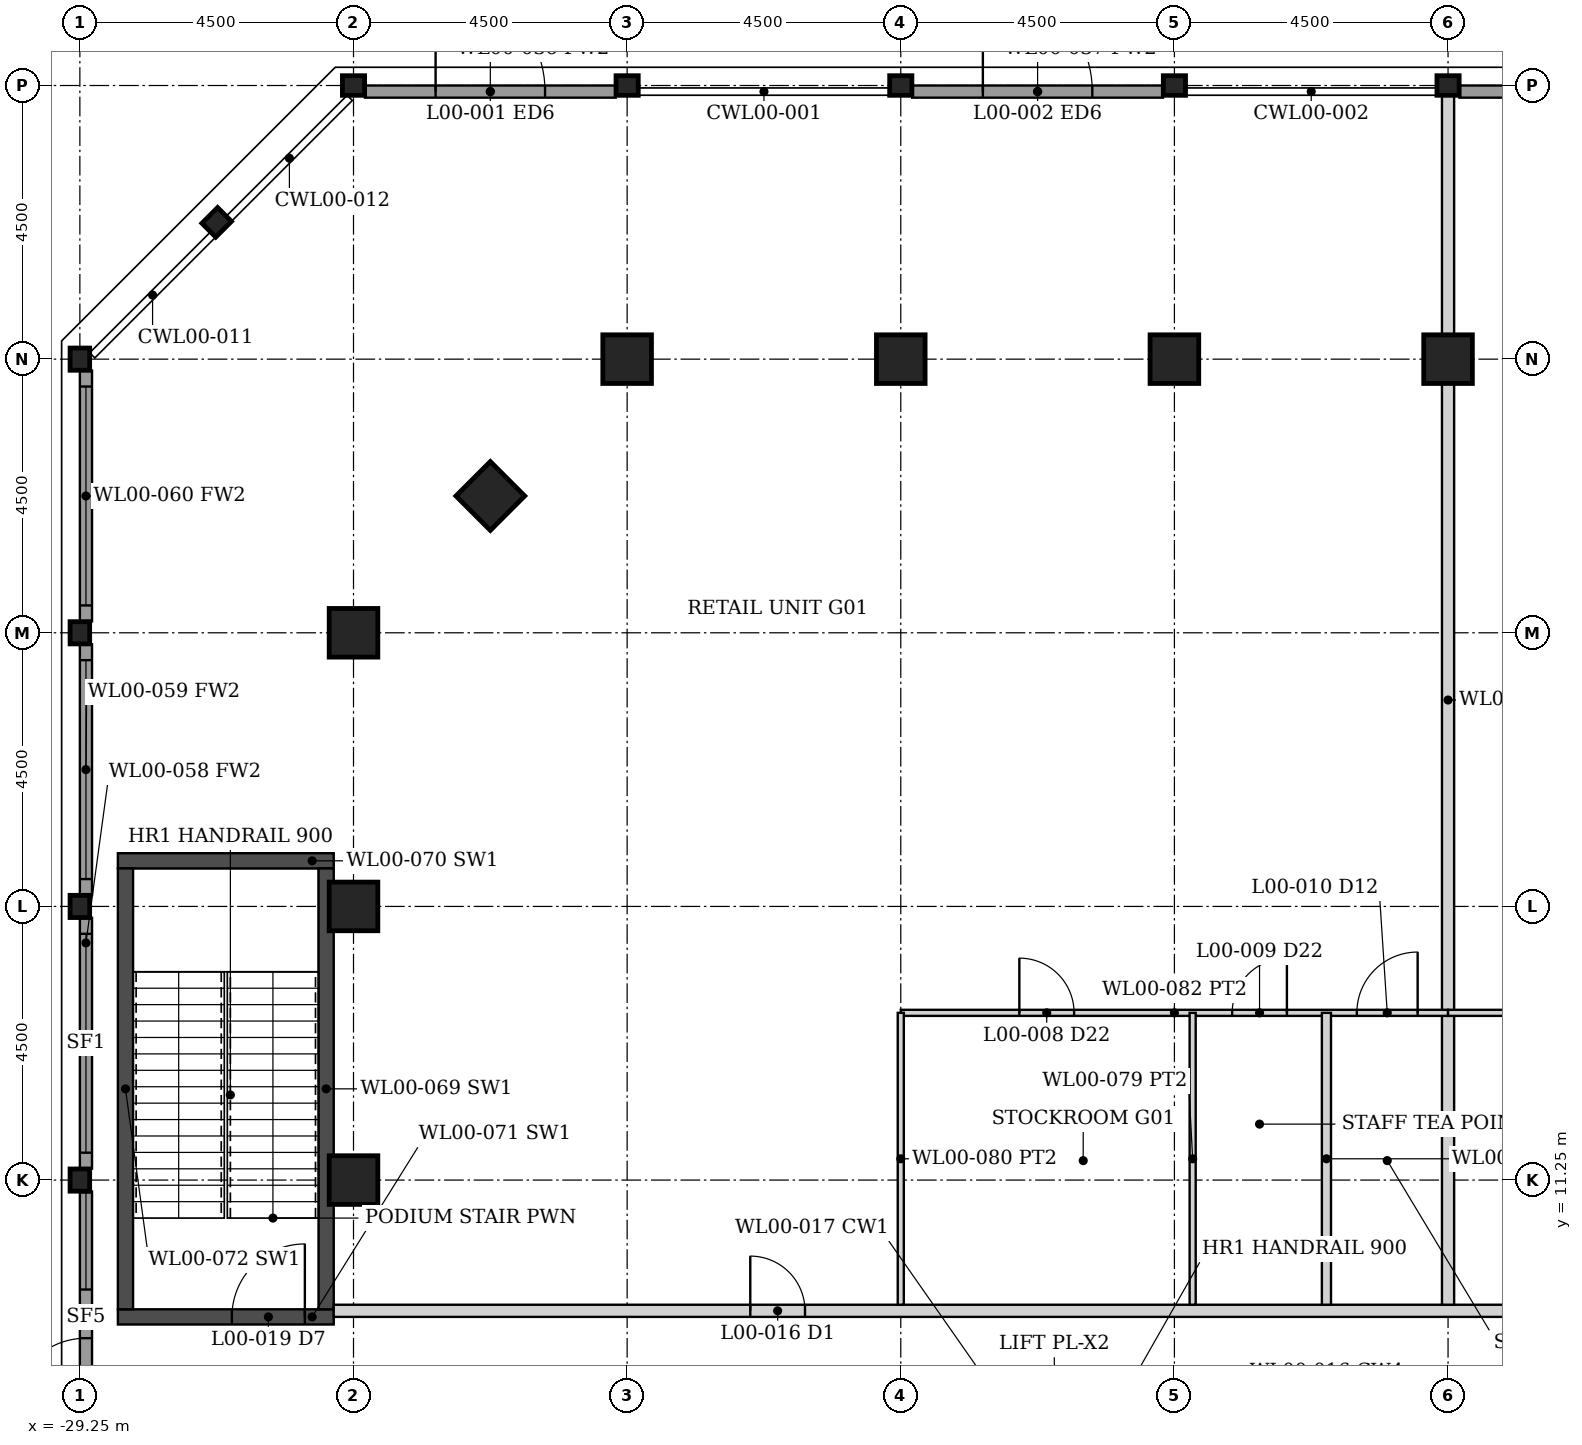
"""IFC4 building model, lengths in metres.
Left out: names, types, materials, properties, quantities, classifications, styles, units other than length and angle.
Written with IfcOpenShell. Run it as: python <this file> out.ifc"""

import sys

from ifc_helpers import new_model, si_unit, direction, frame, frame_2d, origin, origin_2d, place, context, subcontext, project, spatial, rectangle, hollow_rectangle, i_section, extrude, element, fill, save


model = new_model("IFC4")
c1 = context("Model", 3, precision=1e-05, world=origin(), true_north=direction((0.0, 1.0)))
c2 = subcontext(c1, "Body", "Model", "MODEL_VIEW")
j1 = project(units=[si_unit("LENGTHUNIT", "METRE"), si_unit("PLANEANGLEUNIT", "RADIAN")], contexts=[c1])
p1 = place(None, origin())
s1 = spatial("IfcSite", under=j1, at=p1, CompositionType="ELEMENT")
p2 = place(p1, origin())
s2 = spatial("IfcBuilding", under=s1, at=p2, CompositionType="ELEMENT")
p3 = place(p2, origin())
s3 = spatial("IfcBuildingStorey", under=s2, at=p3, CompositionType="ELEMENT", Elevation=0.0)
for number, where, z_axis, x_axis in (
    (1, (-20.25, 24.75, -0.3), (0.0, 0.0, 1.0), (0.0, 1.0, 0.0)),
    (2, (-15.75, 24.75, -0.3), (0.0, 0.0, 1.0), (0.0, 1.0, 0.0)),
    (3, (-11.25, 24.75, -0.3), (0.0, 0.0, 1.0), (0.0, 1.0, 0.0)),
    (4, (-6.75, 24.75, -0.3), (0.0, 0.0, 1.0), (0.0, 1.0, 0.0)),
    (5, (-24.75, 11.25, -0.3), (0.0, 0.0, 1.0), (1.0, 0.0, 0.0)),
    (6, (-24.75, 15.75, -0.3), (0.0, 0.0, 1.0), (1.0, 0.0, 0.0)),
    (7, (-24.75, 20.25, -0.3), (0.0, 0.0, 1.0), (1.0, 0.0, 0.0)),
    (8, (-22.5, 22.5, -0.3), (0.0, 0.0, 1.0), (0.707, -0.707, 0.0)),
):
    element("IfcColumn", number, at=place(p3, frame(where, z_axis=z_axis, x_axis=x_axis)), inside=s3, PredefinedType="COLUMN", context=c2, shape_type="SweptSolid", body=[
        extrude(hollow_rectangle(XDim=0.8, YDim=0.8, WallThickness=0.08, at=origin_2d()), origin(), (0.0, 0.0, 1.0), 6.3),
    ])
for number, where, z_axis, x_axis in (
    (9, (-24.75, 29.25, -0.3), (0.0, 0.0, 1.0), (0.0, 1.0, 0.0)),
    (10, (-20.25, 29.25, -0.3), (0.0, 0.0, 1.0), (0.0, 1.0, 0.0)),
    (11, (-15.75, 29.25, -0.3), (0.0, 0.0, 1.0), (0.0, 1.0, 0.0)),
    (12, (-11.25, 29.25, -0.3), (0.0, 0.0, 1.0), (0.0, 1.0, 0.0)),
    (13, (-6.75, 29.25, -0.3), (0.0, 0.0, 1.0), (0.0, 1.0, 0.0)),
    (14, (-29.25, 11.25, -0.3), (0.0, 0.0, 1.0), (1.0, 0.0, 0.0)),
    (15, (-29.25, 15.75, -0.3), (0.0, 0.0, 1.0), (1.0, 0.0, 0.0)),
    (16, (-29.25, 20.25, -0.3), (0.0, 0.0, 1.0), (1.0, 0.0, 0.0)),
    (17, (-29.25, 24.75, -0.3), (0.0, 0.0, 1.0), (1.0, 0.0, 0.0)),
    (18, (-27.0, 27.0, -0.3), (0.0, 0.0, 1.0), (0.707, -0.707, 0.0)),
):
    element("IfcColumn", number, at=place(p3, frame(where, z_axis=z_axis, x_axis=x_axis)), inside=s3, PredefinedType="COLUMN", context=c2, shape_type="SweptSolid", body=[
        extrude(i_section(OverallWidth=0.322, OverallDepth=0.365, WebThickness=0.027, FlangeThickness=0.044, FilletRadius=0.015, at=origin_2d()), origin(), (0.0, 0.0, 1.0), 6.3),
    ])
p4 = place(p3, frame((-28.625, 9.0, 0.0), z_axis=(0.0, 0.0, 1.0), x_axis=(1.0, 0.0, 0.0)))
e19 = element("IfcWall", 19, at=p4, inside=s3, PredefinedType="SHEAR", context=c2, shape_type="SweptSolid", body=[
    extrude(rectangle(XDim=3.55, YDim=0.25, at=frame_2d((1.775, 0.0))), origin(), (0.0, 0.0, 1.0), 6.0),
])
p5 = place(p4, frame((1.875, 0.0, 0.0)))
e20 = element("IfcOpeningElement", 20, at=p5, cuts=e19, PredefinedType="OPENING", context=c2, shape_type="SweptSolid", body=[
    extrude(rectangle(XDim=1.2, YDim=2.1, at=frame_2d((0.6, 1.05))), frame((0.0, 0.135, 0.0), z_axis=(0.0, -1.0, 0.0), x_axis=(1.0, 0.0, 0.0)), (0.0, 0.0, 1.0), 0.27),
])
p6 = place(p3, frame((-28.625, 16.5, 0.0), z_axis=(0.0, 0.0, 1.0), x_axis=(1.0, 0.0, 0.0)))
e21 = element("IfcWall", 21, at=p6, inside=s3, PredefinedType="SHEAR", context=c2, shape_type="SweptSolid", body=[
    extrude(rectangle(XDim=3.55, YDim=0.25, at=frame_2d((1.775, 0.0))), origin(), (0.0, 0.0, 1.0), 6.0),
])
for number, where, z_axis, x_axis in (
    (22, (-28.5, 9.125, 0.0), (0.0, 0.0, 1.0), (0.0, 1.0, 0.0)),
    (23, (-25.2, 9.125, 0.0), (0.0, 0.0, 1.0), (0.0, 1.0, 0.0)),
):
    element("IfcWall", number, at=place(p3, frame(where, z_axis=z_axis, x_axis=x_axis)), inside=s3, PredefinedType="SHEAR", context=c2, shape_type="SweptSolid", body=[
        extrude(rectangle(XDim=7.25, YDim=0.25, at=frame_2d((3.625, 0.0))), origin(), (0.0, 0.0, 1.0), 6.0),
    ])
p7 = place(p3, frame((-24.562, 29.15, 0.0), z_axis=(0.0, 0.0, 1.0), x_axis=(1.0, 0.0, 0.0)))
e24 = element("IfcWall", 24, at=p7, inside=s3, PredefinedType="SOLIDWALL", context=c2, shape_type="SweptSolid", body=[
    extrude(rectangle(XDim=4.125, YDim=0.2, at=frame_2d((2.062, 0.0))), origin(), (0.0, 0.0, 1.0), 5.133),
])
p8 = place(p7, frame((1.162, 0.0, 0.0)))
e25 = element("IfcOpeningElement", 25, at=p8, cuts=e24, PredefinedType="OPENING", context=c2, shape_type="SweptSolid", body=[
    extrude(rectangle(XDim=1.8, YDim=2.7, at=frame_2d((0.9, 1.35))), frame((0.0, 0.11, 0.0), z_axis=(0.0, -1.0, 0.0), x_axis=(1.0, 0.0, 0.0)), (0.0, 0.0, 1.0), 0.22),
])
p9 = place(p3, frame((-15.562, 29.15, 0.0), z_axis=(0.0, 0.0, 1.0), x_axis=(1.0, 0.0, 0.0)))
e26 = element("IfcWall", 26, at=p9, inside=s3, PredefinedType="SOLIDWALL", context=c2, shape_type="SweptSolid", body=[
    extrude(rectangle(XDim=4.125, YDim=0.2, at=frame_2d((2.062, 0.0))), origin(), (0.0, 0.0, 1.0), 5.133),
])
p10 = place(p9, frame((1.162, 0.0, 0.0)))
e27 = element("IfcOpeningElement", 27, at=p10, cuts=e26, PredefinedType="OPENING", context=c2, shape_type="SweptSolid", body=[
    extrude(rectangle(XDim=1.8, YDim=2.7, at=frame_2d((0.9, 1.35))), frame((0.0, 0.11, 0.0), z_axis=(0.0, -1.0, 0.0), x_axis=(1.0, 0.0, 0.0)), (0.0, 0.0, 1.0), 0.22),
])
p11 = place(p3, frame((-6.562, 29.15, 0.0), z_axis=(0.0, 0.0, 1.0), x_axis=(1.0, 0.0, 0.0)))
e28 = element("IfcWall", 28, at=p11, inside=s3, PredefinedType="SOLIDWALL", context=c2, shape_type="SweptSolid", body=[
    extrude(rectangle(XDim=4.125, YDim=0.2, at=frame_2d((2.062, 0.0))), origin(), (0.0, 0.0, 1.0), 5.133),
])
p12 = place(p11, frame((1.162, 0.0, 0.0)))
e29 = element("IfcOpeningElement", 29, at=p12, cuts=e28, PredefinedType="OPENING", context=c2, shape_type="SweptSolid", body=[
    extrude(rectangle(XDim=1.8, YDim=2.7, at=frame_2d((0.9, 1.35))), frame((0.0, 0.11, 0.0), z_axis=(0.0, -1.0, 0.0), x_axis=(1.0, 0.0, 0.0)), (0.0, 0.0, 1.0), 0.22),
])
p13 = place(p3, frame((-29.15, 6.938, 0.0), z_axis=(0.0, 0.0, 1.0), x_axis=(0.0, 1.0, 0.0)))
e30 = element("IfcWall", 30, at=p13, inside=s3, PredefinedType="SOLIDWALL", context=c2, shape_type="SweptSolid", body=[
    extrude(rectangle(XDim=4.125, YDim=0.2, at=frame_2d((2.062, 0.0))), origin(), (0.0, 0.0, 1.0), 5.133),
])
p14 = place(p13, frame((0.512, 0.0, 0.0)))
e31 = element("IfcOpeningElement", 31, at=p14, cuts=e30, PredefinedType="OPENING", context=c2, shape_type="SweptSolid", body=[
    extrude(rectangle(XDim=1.2, YDim=2.4, at=frame_2d((0.6, 1.2))), frame((0.0, 0.11, 0.0), z_axis=(0.0, -1.0, 0.0), x_axis=(1.0, 0.0, 0.0)), (0.0, 0.0, 1.0), 0.22),
])
p15 = place(p13, frame((2.512, 0.0, 0.15)))
e32 = element("IfcOpeningElement", 32, at=p15, cuts=e30, PredefinedType="OPENING", context=c2, shape_type="SweptSolid", body=[
    extrude(rectangle(XDim=1.6, YDim=4.833, at=frame_2d((0.8, 2.417))), frame((0.0, 0.11, 0.0), z_axis=(0.0, -1.0, 0.0), x_axis=(1.0, 0.0, 0.0)), (0.0, 0.0, 1.0), 0.22),
])
p16 = place(p3, frame((-29.15, 11.438, 0.0), z_axis=(0.0, 0.0, 1.0), x_axis=(0.0, 1.0, 0.0)))
e33 = element("IfcWall", 33, at=p16, inside=s3, PredefinedType="SOLIDWALL", context=c2, shape_type="SweptSolid", body=[
    extrude(rectangle(XDim=4.125, YDim=0.2, at=frame_2d((2.062, 0.0))), origin(), (0.0, 0.0, 1.0), 5.133),
])
p17 = place(p16, frame((0.262, 0.0, 0.15)))
e34 = element("IfcOpeningElement", 34, at=p17, cuts=e33, PredefinedType="OPENING", context=c2, shape_type="SweptSolid", body=[
    extrude(rectangle(XDim=3.6, YDim=4.833, at=frame_2d((1.8, 2.417))), frame((0.0, 0.11, 0.0), z_axis=(0.0, -1.0, 0.0), x_axis=(1.0, 0.0, 0.0)), (0.0, 0.0, 1.0), 0.22),
])
p18 = place(p3, frame((-29.15, 15.938, 0.0), z_axis=(0.0, 0.0, 1.0), x_axis=(0.0, 1.0, 0.0)))
e35 = element("IfcWall", 35, at=p18, inside=s3, PredefinedType="SOLIDWALL", context=c2, shape_type="SweptSolid", body=[
    extrude(rectangle(XDim=4.125, YDim=0.2, at=frame_2d((2.062, 0.0))), origin(), (0.0, 0.0, 1.0), 5.133),
])
p19 = place(p18, frame((0.262, 0.0, 0.15)))
e36 = element("IfcOpeningElement", 36, at=p19, cuts=e35, PredefinedType="OPENING", context=c2, shape_type="SweptSolid", body=[
    extrude(rectangle(XDim=3.6, YDim=4.833, at=frame_2d((1.8, 2.417))), frame((0.0, 0.11, 0.0), z_axis=(0.0, -1.0, 0.0), x_axis=(1.0, 0.0, 0.0)), (0.0, 0.0, 1.0), 0.22),
])
p20 = place(p3, frame((-29.15, 20.438, 0.0), z_axis=(0.0, 0.0, 1.0), x_axis=(0.0, 1.0, 0.0)))
e37 = element("IfcWall", 37, at=p20, inside=s3, PredefinedType="SOLIDWALL", context=c2, shape_type="SweptSolid", body=[
    extrude(rectangle(XDim=4.125, YDim=0.2, at=frame_2d((2.062, 0.0))), origin(), (0.0, 0.0, 1.0), 5.133),
])
p21 = place(p20, frame((0.262, 0.0, 0.15)))
e38 = element("IfcOpeningElement", 38, at=p21, cuts=e37, PredefinedType="OPENING", context=c2, shape_type="SweptSolid", body=[
    extrude(rectangle(XDim=3.6, YDim=4.833, at=frame_2d((1.8, 2.417))), frame((0.0, 0.11, 0.0), z_axis=(0.0, -1.0, 0.0), x_axis=(1.0, 0.0, 0.0)), (0.0, 0.0, 1.0), 0.22),
])
p22 = place(p3, frame((-25.075, 9.1, 0.0), z_axis=(0.0, 0.0, 1.0), x_axis=(1.0, 0.0, 0.0)))
e39 = element("IfcWall", 39, at=p22, inside=s3, PredefinedType="PARTITIONING", context=c2, shape_type="SweptSolid", body=[
    extrude(rectangle(XDim=50.15, YDim=0.2, at=frame_2d((25.075, 0.0))), origin(), (0.0, 0.0, 1.0), 4.829),
])
p23 = place(p22, frame((6.85, 0.0, 0.0)))
e40 = element("IfcOpeningElement", 40, at=p23, cuts=e39, PredefinedType="OPENING", context=c2, shape_type="SweptSolid", body=[
    extrude(rectangle(XDim=0.9, YDim=2.1, at=frame_2d((0.45, 1.05))), frame((0.0, 0.11, 0.0), z_axis=(0.0, -1.0, 0.0), x_axis=(1.0, 0.0, 0.0)), (0.0, 0.0, 1.0), 0.22),
])
p24 = place(p22, frame((24.625, 0.0, 0.0)))
e41 = element("IfcOpeningElement", 41, at=p24, cuts=e39, PredefinedType="OPENING", context=c2, shape_type="SweptSolid", body=[
    extrude(rectangle(XDim=0.9, YDim=2.1, at=frame_2d((0.45, 1.05))), frame((0.0, 0.11, 0.0), z_axis=(0.0, -1.0, 0.0), x_axis=(1.0, 0.0, 0.0)), (0.0, 0.0, 1.0), 0.22),
])
p25 = place(p22, frame((42.4, 0.0, 0.0)))
e42 = element("IfcOpeningElement", 42, at=p25, cuts=e39, PredefinedType="OPENING", context=c2, shape_type="SweptSolid", body=[
    extrude(rectangle(XDim=0.9, YDim=2.1, at=frame_2d((0.45, 1.05))), frame((0.0, 0.11, 0.0), z_axis=(0.0, -1.0, 0.0), x_axis=(1.0, 0.0, 0.0)), (0.0, 0.0, 1.0), 0.22),
])
p26 = place(p3, frame((-6.75, 9.2, 0.0), z_axis=(0.0, 0.0, 1.0), x_axis=(0.0, 1.0, 0.0)))
e43 = element("IfcWall", 43, at=p26, inside=s3, PredefinedType="PARTITIONING", context=c2, shape_type="SweptSolid", body=[
    extrude(rectangle(XDim=19.889, YDim=0.2, at=frame_2d((9.944, 0.0))), origin(), (0.0, 0.0, 1.0), 4.829),
])
p27 = place(p3, frame((-15.75, 14.0, 0.0), z_axis=(0.0, 0.0, 1.0), x_axis=(1.0, 0.0, 0.0)))
e44 = element("IfcWall", 44, at=p27, inside=s3, PredefinedType="PARTITIONING", context=c2, shape_type="SweptSolid", body=[
    extrude(rectangle(XDim=9.0, YDim=0.1, at=frame_2d((4.5, 0.0))), origin(), (0.0, 0.0, 1.0), 4.829),
])
p28 = place(p27, frame((1.95, 0.0, 0.0)))
e45 = element("IfcOpeningElement", 45, at=p28, cuts=e44, PredefinedType="OPENING", context=c2, shape_type="SweptSolid", body=[
    extrude(rectangle(XDim=0.9, YDim=2.1, at=frame_2d((0.45, 1.05))), frame((0.0, 0.06, 0.0), z_axis=(0.0, -1.0, 0.0), x_axis=(1.0, 0.0, 0.0)), (0.0, 0.0, 1.0), 0.12),
])
p29 = place(p27, frame((5.45, 0.0, 0.0)))
e46 = element("IfcOpeningElement", 46, at=p29, cuts=e44, PredefinedType="OPENING", context=c2, shape_type="SweptSolid", body=[
    extrude(rectangle(XDim=0.9, YDim=2.1, at=frame_2d((0.45, 1.05))), frame((0.0, 0.06, 0.0), z_axis=(0.0, -1.0, 0.0), x_axis=(1.0, 0.0, 0.0)), (0.0, 0.0, 1.0), 0.12),
])
p30 = place(p27, frame((7.5, 0.0, 0.0)))
e47 = element("IfcOpeningElement", 47, at=p30, cuts=e44, PredefinedType="OPENING", context=c2, shape_type="SweptSolid", body=[
    extrude(rectangle(XDim=1.0, YDim=2.1, at=frame_2d((0.5, 1.05))), frame((0.0, 0.06, 0.0), z_axis=(0.0, -1.0, 0.0), x_axis=(1.0, 0.0, 0.0)), (0.0, 0.0, 1.0), 0.12),
])
for number, where, z_axis, x_axis in (
    (48, (-15.75, 9.2, 0.0), (0.0, 0.0, 1.0), (0.0, 1.0, 0.0)),
    (49, (-10.95, 9.2, 0.0), (0.0, 0.0, 1.0), (0.0, 1.0, 0.0)),
):
    element("IfcWall", number, at=place(p3, frame(where, z_axis=z_axis, x_axis=x_axis)), inside=s3, PredefinedType="PARTITIONING", context=c2, shape_type="SweptSolid", body=[
        extrude(rectangle(XDim=4.8, YDim=0.1, at=frame_2d((2.4, 0.0))), origin(), (0.0, 0.0, 1.0), 4.829),
    ])
p31 = place(p3, frame((-8.75, 9.2, 0.0), z_axis=(0.0, 0.0, 1.0), x_axis=(0.0, 1.0, 0.0)))
e50 = element("IfcWall", 50, at=p31, inside=s3, PredefinedType="PARTITIONING", context=c2, shape_type="SweptSolid", body=[
    extrude(rectangle(XDim=4.8, YDim=0.15, at=frame_2d((2.4, 0.0))), origin(), (0.0, 0.0, 1.0), 4.829),
])
p32 = place(p3, frame((-6.75, 14.0, 0.0), z_axis=(0.0, 0.0, 1.0), x_axis=(1.0, 0.0, 0.0)))
e51 = element("IfcWall", 51, at=p32, inside=s3, PredefinedType="PARTITIONING", context=c2, shape_type="SweptSolid", body=[
    extrude(rectangle(XDim=4.5, YDim=0.1, at=frame_2d((2.25, 0.0))), origin(), (0.0, 0.0, 1.0), 4.829),
])
p33 = place(p32, frame((1.8, 0.0, 0.0)))
e52 = element("IfcOpeningElement", 52, at=p33, cuts=e51, PredefinedType="OPENING", context=c2, shape_type="SweptSolid", body=[
    extrude(rectangle(XDim=0.9, YDim=2.1, at=frame_2d((0.45, 1.05))), frame((0.0, 0.06, 0.0), z_axis=(0.0, -1.0, 0.0), x_axis=(1.0, 0.0, 0.0)), (0.0, 0.0, 1.0), 0.12),
])
p34 = place(p8, origin())
e53 = element("IfcDoor", 53, at=p34, inside=s3, OperationType="DOUBLE_DOOR_SINGLE_SWING", PredefinedType="DOOR", context=c2, shape_type="SweptSolid", body=[
    extrude(rectangle(XDim=1.8, YDim=2.7, at=frame_2d((0.9, 1.35))), frame((0.0, 0.025, 0.0), z_axis=(0.0, -1.0, 0.0), x_axis=(1.0, 0.0, 0.0)), (0.0, 0.0, 1.0), 0.05),
])
fill(e25, e53)
p35 = place(p10, origin())
e54 = element("IfcDoor", 54, at=p35, inside=s3, OperationType="DOUBLE_DOOR_SINGLE_SWING", PredefinedType="DOOR", context=c2, shape_type="SweptSolid", body=[
    extrude(rectangle(XDim=1.8, YDim=2.7, at=frame_2d((0.9, 1.35))), frame((0.0, 0.025, 0.0), z_axis=(0.0, -1.0, 0.0), x_axis=(1.0, 0.0, 0.0)), (0.0, 0.0, 1.0), 0.05),
])
fill(e27, e54)
p36 = place(p14, origin())
e55 = element("IfcDoor", 55, at=p36, inside=s3, OperationType="SINGLE_SWING_LEFT", PredefinedType="DOOR", context=c2, shape_type="SweptSolid", body=[
    extrude(rectangle(XDim=1.2, YDim=2.4, at=frame_2d((0.6, 1.2))), frame((0.0, 0.025, 0.0), z_axis=(0.0, -1.0, 0.0), x_axis=(1.0, 0.0, 0.0)), (0.0, 0.0, 1.0), 0.05),
])
fill(e31, e55)
p37 = place(p15, origin())
e56 = element("IfcWindow", 56, at=p37, inside=s3, PartitioningType="SINGLE_PANEL", PredefinedType="WINDOW", context=c2, shape_type="SweptSolid", body=[
    extrude(rectangle(XDim=1.6, YDim=4.833, at=frame_2d((0.8, 2.417))), frame((0.0, 0.03, 0.0), z_axis=(0.0, -1.0, 0.0), x_axis=(1.0, 0.0, 0.0)), (0.0, 0.0, 1.0), 0.06),
])
fill(e32, e56)
p38 = place(p17, origin())
e57 = element("IfcWindow", 57, at=p38, inside=s3, PartitioningType="SINGLE_PANEL", PredefinedType="WINDOW", context=c2, shape_type="SweptSolid", body=[
    extrude(rectangle(XDim=3.6, YDim=4.833, at=frame_2d((1.8, 2.417))), frame((0.0, 0.03, 0.0), z_axis=(0.0, -1.0, 0.0), x_axis=(1.0, 0.0, 0.0)), (0.0, 0.0, 1.0), 0.06),
])
fill(e34, e57)
p39 = place(p19, origin())
e58 = element("IfcWindow", 58, at=p39, inside=s3, PartitioningType="SINGLE_PANEL", PredefinedType="WINDOW", context=c2, shape_type="SweptSolid", body=[
    extrude(rectangle(XDim=3.6, YDim=4.833, at=frame_2d((1.8, 2.417))), frame((0.0, 0.03, 0.0), z_axis=(0.0, -1.0, 0.0), x_axis=(1.0, 0.0, 0.0)), (0.0, 0.0, 1.0), 0.06),
])
fill(e36, e58)
p40 = place(p21, origin())
e59 = element("IfcWindow", 59, at=p40, inside=s3, PartitioningType="SINGLE_PANEL", PredefinedType="WINDOW", context=c2, shape_type="SweptSolid", body=[
    extrude(rectangle(XDim=3.6, YDim=4.833, at=frame_2d((1.8, 2.417))), frame((0.0, 0.03, 0.0), z_axis=(0.0, -1.0, 0.0), x_axis=(1.0, 0.0, 0.0)), (0.0, 0.0, 1.0), 0.06),
])
fill(e38, e59)
p41 = place(p28, origin())
e60 = element("IfcDoor", 60, at=p41, inside=s3, OperationType="SINGLE_SWING_LEFT", PredefinedType="DOOR", context=c2, shape_type="SweptSolid", body=[
    extrude(rectangle(XDim=0.9, YDim=2.1, at=frame_2d((0.45, 1.05))), frame((0.0, 0.025, 0.0), z_axis=(0.0, -1.0, 0.0), x_axis=(1.0, 0.0, 0.0)), (0.0, 0.0, 1.0), 0.05),
])
fill(e45, e60)
p42 = place(p29, origin())
e61 = element("IfcDoor", 61, at=p42, inside=s3, OperationType="SINGLE_SWING_RIGHT", PredefinedType="DOOR", context=c2, shape_type="SweptSolid", body=[
    extrude(rectangle(XDim=0.9, YDim=2.1, at=frame_2d((0.45, 1.05))), frame((0.0, 0.025, 0.0), z_axis=(0.0, -1.0, 0.0), x_axis=(1.0, 0.0, 0.0)), (0.0, 0.0, 1.0), 0.05),
])
fill(e46, e61)
p43 = place(p30, origin())
e62 = element("IfcDoor", 62, at=p43, inside=s3, OperationType="SINGLE_SWING_RIGHT", PredefinedType="DOOR", context=c2, shape_type="SweptSolid", body=[
    extrude(rectangle(XDim=1.0, YDim=2.1, at=frame_2d((0.5, 1.05))), frame((0.0, 0.025, 0.0), z_axis=(0.0, -1.0, 0.0), x_axis=(1.0, 0.0, 0.0)), (0.0, 0.0, 1.0), 0.05),
])
fill(e47, e62)
p44 = place(p23, origin())
e63 = element("IfcDoor", 63, at=p44, inside=s3, OperationType="SINGLE_SWING_LEFT", PredefinedType="DOOR", context=c2, shape_type="SweptSolid", body=[
    extrude(rectangle(XDim=0.9, YDim=2.1, at=frame_2d((0.45, 1.05))), frame((0.0, 0.025, 0.0), z_axis=(0.0, -1.0, 0.0), x_axis=(1.0, 0.0, 0.0)), (0.0, 0.0, 1.0), 0.05),
])
fill(e40, e63)
p45 = place(p5, origin())
e64 = element("IfcDoor", 64, at=p45, inside=s3, OperationType="SINGLE_SWING_RIGHT", PredefinedType="DOOR", context=c2, shape_type="SweptSolid", body=[
    extrude(rectangle(XDim=1.2, YDim=2.1, at=frame_2d((0.6, 1.05))), frame((0.0, 0.025, 0.0), z_axis=(0.0, -1.0, 0.0), x_axis=(1.0, 0.0, 0.0)), (0.0, 0.0, 1.0), 0.05),
])
fill(e20, e64)
save(model, sys.argv[1])
